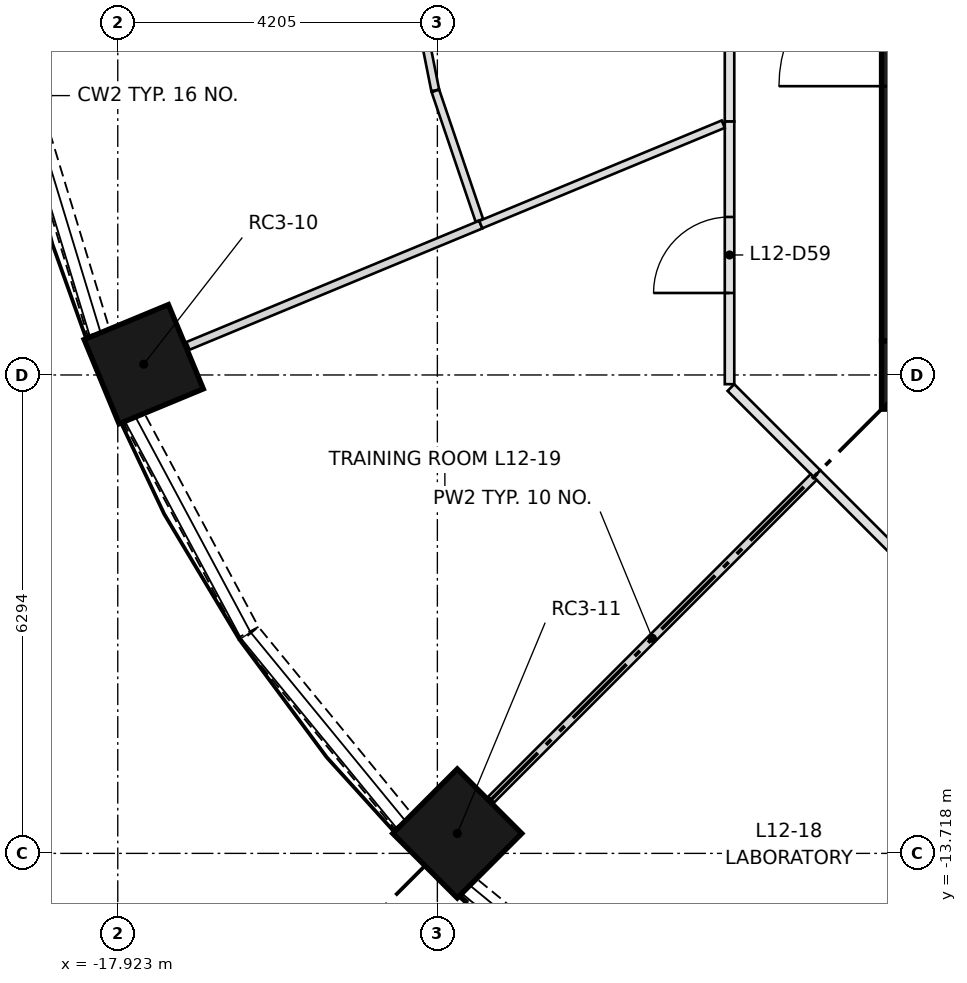
"""IFC4 building model, lengths in metres.
Left out: names, types, materials, properties, quantities, classifications, styles, units other than length and angle.
Written with IfcOpenShell. Run it as: python <this file> out.ifc"""

import sys

from ifc_helpers import new_model, si_unit, direction, frame, frame_2d, origin, origin_2d, place, context, subcontext, project, spatial, rectangle, extrude, element, fill, save


model = new_model("IFC4")
c1 = context("Model", 3, precision=1e-05, world=origin(), true_north=direction((0.0, 1.0)))
c2 = subcontext(c1, "Body", "Model", "MODEL_VIEW")
j1 = project(units=[si_unit("LENGTHUNIT", "METRE"), si_unit("PLANEANGLEUNIT", "RADIAN")], contexts=[c1])
p1 = place(None, origin())
s1 = spatial("IfcSite", under=j1, at=p1, CompositionType="ELEMENT")
p2 = place(p1, origin())
s2 = spatial("IfcBuilding", under=s1, at=p2, CompositionType="ELEMENT")
p3 = place(p2, frame((0.0, 0.0, 48.1)))
s3 = spatial("IfcBuildingStorey", under=s2, at=p3, CompositionType="ELEMENT", Elevation=48.1)
for number, where, z_axis, x_axis in (
    (1, (-17.582, -7.282, 0.0), (0.0, 0.0, 1.0), (-0.924, -0.383, 0.0)),
    (2, (-13.456, -13.456, 0.0), (0.0, 0.0, 1.0), (-0.707, -0.707, 0.0)),
):
    element("IfcColumn", number, at=place(p3, frame(where, z_axis=z_axis, x_axis=x_axis)), inside=s3, PredefinedType="COLUMN", context=c2, shape_type="SweptSolid", body=[
        extrude(rectangle(XDim=1.2, YDim=1.2, at=origin_2d()), origin(), (0.0, 0.0, 1.0), 3.65),
    ])
p4 = place(p3, frame((-7.874, -7.424, 0.0), z_axis=(0.0, 0.0, 1.0), x_axis=(1.0, 0.0, 0.0)))
e3 = element("IfcWall", 3, at=p4, inside=s3, PredefinedType="SHEAR", context=c2, shape_type="SweptSolid", body=[
    extrude(rectangle(XDim=15.748, YDim=0.9, at=frame_2d((7.874, 0.0))), origin(), (0.0, 0.0, 1.0), 3.65),
])
p5 = place(p3, frame((-7.424, -6.974, 0.0), z_axis=(0.0, 0.0, 1.0), x_axis=(0.0, 1.0, 0.0)))
e4 = element("IfcWall", 4, at=p5, inside=s3, PredefinedType="SHEAR", context=c2, shape_type="SweptSolid", body=[
    extrude(rectangle(XDim=13.948, YDim=0.9, at=frame_2d((6.974, 0.0))), origin(), (0.0, 0.0, 1.0), 3.65),
])
p6 = place(p5, frame((6.474, 0.0, 0.0)))
e5 = element("IfcOpeningElement", 5, at=p6, cuts=e4, PredefinedType="OPENING", context=c2, shape_type="SweptSolid", body=[
    extrude(rectangle(XDim=1.0, YDim=2.1, at=frame_2d((0.5, 1.05))), frame((0.0, 0.46, 0.0), z_axis=(0.0, -1.0, 0.0), x_axis=(1.0, 0.0, 0.0)), (0.0, 0.0, 1.0), 0.92),
])
p7 = place(p5, frame((3.35, 0.0, 0.0)))
e6 = element("IfcOpeningElement", 6, at=p7, cuts=e4, PredefinedType="OPENING", context=c2, shape_type="SweptSolid", body=[
    extrude(rectangle(XDim=1.8, YDim=2.1, at=frame_2d((0.9, 1.05))), frame((0.0, 0.46, 0.0), z_axis=(0.0, -1.0, 0.0), x_axis=(1.0, 0.0, 0.0)), (0.0, 0.0, 1.0), 0.92),
])
p8 = place(p5, frame((8.799, 0.0, 0.0)))
e7 = element("IfcOpeningElement", 7, at=p8, cuts=e4, PredefinedType="OPENING", context=c2, shape_type="SweptSolid", body=[
    extrude(rectangle(XDim=1.8, YDim=2.1, at=frame_2d((0.9, 1.05))), frame((0.0, 0.46, 0.0), z_axis=(0.0, -1.0, 0.0), x_axis=(1.0, 0.0, 0.0)), (0.0, 0.0, 1.0), 0.92),
])
p9 = place(p5, frame((11.974, 0.0, 0.0)))
e8 = element("IfcOpeningElement", 8, at=p9, cuts=e4, PredefinedType="OPENING", context=c2, shape_type="SweptSolid", body=[
    extrude(rectangle(XDim=1.0, YDim=2.1, at=frame_2d((0.5, 1.05))), frame((0.0, 0.46, 0.0), z_axis=(0.0, -1.0, 0.0), x_axis=(1.0, 0.0, 0.0)), (0.0, 0.0, 1.0), 0.92),
])
p10 = place(p3, frame((-19.102, -3.814, 0.0), z_axis=(0.0, 0.0, 1.0), x_axis=(0.290585541792, -0.956849017819, 0.0)))
e9 = element("IfcWall", 9, at=p10, inside=s3, PredefinedType="SOLIDWALL", context=c2, shape_type="SweptSolid", body=[
    extrude(rectangle(XDim=3.188, YDim=0.3, at=frame_2d((1.594, 0.0))), origin(), (0.0, 0.0, 1.0), 0.9),
])
p11 = place(p3, frame((-17.706, -7.998, 0.0), z_axis=(0.0, 0.0, 1.0), x_axis=(0.471260138764, -0.881994263934, 0.0)))
e10 = element("IfcWall", 10, at=p11, inside=s3, PredefinedType="SOLIDWALL", context=c2, shape_type="SweptSolid", body=[
    extrude(rectangle(XDim=3.187, YDim=0.3, at=frame_2d((1.593, 0.0))), origin(), (0.0, 0.0, 1.0), 0.9),
])
for number, where, z_axis, x_axis in (
    (11, (-16.188, -10.833, 0.0), (0.0, 0.0, 1.0), (0.634, -0.773, 0.0)),
    (12, (-13.298, -14.166, 0.0), (0.0, 0.0, 1.0), (0.773, -0.634, 0.0)),
):
    element("IfcWall", number, at=place(p3, frame(where, z_axis=z_axis, x_axis=x_axis)), inside=s3, PredefinedType="SOLIDWALL", context=c2, shape_type="SweptSolid", body=[
        extrude(rectangle(XDim=3.188, YDim=0.3, at=frame_2d((1.594, 0.0))), origin(), (0.0, 0.0, 1.0), 0.9),
    ])
p12 = place(p3, frame((-9.874, -4.09, 0.0), z_axis=(0.0, 0.0, 1.0), x_axis=(0.0, 1.0, 0.0)))
e13 = element("IfcWall", 13, at=p12, inside=s3, PredefinedType="PARTITIONING", context=c2, shape_type="SweptSolid", body=[
    extrude(rectangle(XDim=4.09, YDim=0.125, at=frame_2d((2.045, 0.0))), origin(), (0.0, 0.0, 1.0), 3.3),
])
p13 = place(p12, frame((1.5, 0.0, 0.0)))
e14 = element("IfcOpeningElement", 14, at=p13, cuts=e13, PredefinedType="OPENING", context=c2, shape_type="SweptSolid", body=[
    extrude(rectangle(XDim=1.0, YDim=2.1, at=frame_2d((0.5, 1.05))), frame((0.0, 0.073, 0.0), z_axis=(0.0, -1.0, 0.0), x_axis=(1.0, 0.0, 0.0)), (0.0, 0.0, 1.0), 0.145),
])
p14 = place(p3, frame((-9.874, -7.545, 0.0), z_axis=(0.0, 0.0, 1.0), x_axis=(0.0, 1.0, 0.0)))
e15 = element("IfcWall", 15, at=p14, inside=s3, PredefinedType="PARTITIONING", context=c2, shape_type="SweptSolid", body=[
    extrude(rectangle(XDim=3.455, YDim=0.125, at=frame_2d((1.728, 0.0))), origin(), (0.0, 0.0, 1.0), 3.3),
])
p15 = place(p14, frame((1.2, 0.0, 0.0)))
e16 = element("IfcOpeningElement", 16, at=p15, cuts=e15, PredefinedType="OPENING", context=c2, shape_type="SweptSolid", body=[
    extrude(rectangle(XDim=1.0, YDim=2.1, at=frame_2d((0.5, 1.05))), frame((0.0, 0.073, 0.0), z_axis=(0.0, -1.0, 0.0), x_axis=(1.0, 0.0, 0.0)), (0.0, 0.0, 1.0), 0.145),
])
for number, where, z_axis, x_axis in (
    (17, (-8.722, -8.722, 0.0), (0.0, 0.0, 1.0), (-0.707, 0.707, 0.0)),
    (18, (-7.589, -9.856, 0.0), (0.0, 0.0, 1.0), (-0.707, 0.707, 0.0)),
):
    element("IfcWall", number, at=place(p3, frame(where, z_axis=z_axis, x_axis=x_axis)), inside=s3, PredefinedType="PARTITIONING", context=c2, shape_type="SweptSolid", body=[
        extrude(rectangle(XDim=1.603, YDim=0.125, at=frame_2d((0.801, 0.0))), origin(), (0.0, 0.0, 1.0), 3.3),
    ])
p16 = place(p3, frame((-14.108, -1.861, 0.0), z_axis=(0.0, 0.0, 1.0), x_axis=(0.195103348377, -0.980782689209, 0.0)))
e19 = element("IfcWall", 19, at=p16, inside=s3, PredefinedType="PARTITIONING", context=c2, shape_type="SweptSolid", body=[
    extrude(rectangle(XDim=1.854, YDim=0.105, at=frame_2d((0.927, 0.0))), origin(), (0.0, 0.0, 1.0), 3.3),
])
p17 = place(p3, frame((-13.744, -3.686, 0.0), z_axis=(0.0, 0.0, 1.0), x_axis=(0.321433227273, -0.946932246998, 0.0)))
e20 = element("IfcWall", 20, at=p17, inside=s3, PredefinedType="PARTITIONING", context=c2, shape_type="SweptSolid", body=[
    extrude(rectangle(XDim=1.799, YDim=0.105, at=frame_2d((0.9, 0.0))), origin(), (0.0, 0.0, 1.0), 3.3),
])
p18 = place(p3, frame((-13.147, -5.446, 0.0), z_axis=(0.0, 0.0, 1.0), x_axis=(-0.923873410436, -0.382698212028, 0.0)))
e21 = element("IfcWall", 21, at=p18, inside=s3, PredefinedType="PARTITIONING", context=c2, shape_type="SweptSolid", body=[
    extrude(rectangle(XDim=4.17, YDim=0.11, at=frame_2d((2.085, 0.0))), origin(), (0.0, 0.0, 1.0), 3.3),
])
p19 = place(p3, frame((-9.957, -4.124, 0.0), z_axis=(0.0, 0.0, 1.0), x_axis=(-0.923867748948, -0.382711879165, 0.0)))
e22 = element("IfcWall", 22, at=p19, inside=s3, PredefinedType="PARTITIONING", context=c2, shape_type="SweptSolid", body=[
    extrude(rectangle(XDim=3.453, YDim=0.105, at=frame_2d((1.727, 0.0))), origin(), (0.0, 0.0, 1.0), 3.3),
])
p20 = place(p3, frame((-13.011, -13.011, 0.0), z_axis=(0.0, 0.0, 1.0), x_axis=(0.707106781187, 0.707106781187, 0.0)))
e23 = element("IfcWall", 23, at=p20, inside=s3, PredefinedType="PARTITIONING", context=c2, shape_type="SweptSolid", body=[
    extrude(rectangle(XDim=6.002, YDim=0.11, at=frame_2d((3.001, 0.0))), origin(), (0.0, 0.0, 1.0), 3.3),
])
p21 = place(p15, origin())
e24 = element("IfcDoor", 24, at=p21, inside=s3, OperationType="SINGLE_SWING_LEFT", PredefinedType="DOOR", context=c2, shape_type="SweptSolid", body=[
    extrude(rectangle(XDim=1.0, YDim=2.1, at=frame_2d((0.5, 1.05))), frame((0.0, 0.025, 0.0), z_axis=(0.0, -1.0, 0.0), x_axis=(1.0, 0.0, 0.0)), (0.0, 0.0, 1.0), 0.05),
])
fill(e16, e24)
save(model, sys.argv[1])
